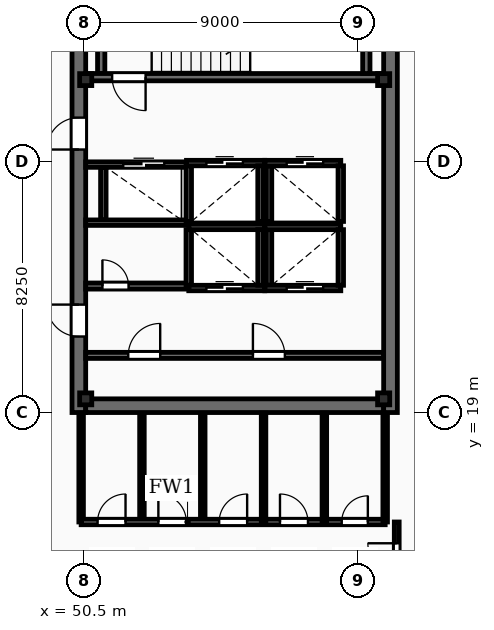
"""IFC4 building model, lengths in metres.
Left out: names, types, materials, properties, quantities, classifications, styles, units other than length and angle.
Written with IfcOpenShell. Run it as: python <this file> out.ifc"""

import sys

from ifc_helpers import new_model, si_unit, direction, frame, frame_2d, origin, origin_2d, place, context, subcontext, project, spatial, rectangle, i_section, extrude, element, fill, save


model = new_model("IFC4")
c1 = context("Model", 3, precision=1e-05, world=origin(), true_north=direction((0.0, 1.0)))
c2 = subcontext(c1, "Body", "Model", "MODEL_VIEW")
j1 = project(units=[si_unit("LENGTHUNIT", "METRE"), si_unit("PLANEANGLEUNIT", "RADIAN")], contexts=[c1])
p1 = place(None, origin())
s1 = spatial("IfcSite", under=j1, at=p1, CompositionType="ELEMENT")
p2 = place(p1, origin())
s2 = spatial("IfcBuilding", under=s1, at=p2, CompositionType="ELEMENT")
p3 = place(p2, frame((0.0, 0.0, 232.2)))
s3 = spatial("IfcBuildingStorey", under=s2, at=p3, CompositionType="ELEMENT", Elevation=232.2)
p4 = place(p3, frame((50.325, 19.0, -0.27), z_axis=(0.0, 0.0, 1.0), x_axis=(0.0, 1.0, 0.0)))
e1 = element("IfcWall", 1, at=p4, inside=s3, PredefinedType="SHEAR", context=c2, shape_type="SweptSolid", body=[
    extrude(rectangle(XDim=20.8, YDim=0.45, at=frame_2d((10.4, 0.0))), origin(), (0.0, 0.0, 1.0), 3.75),
])
p5 = place(p4, frame((2.5, 0.0, 0.27)))
e2 = element("IfcOpeningElement", 2, at=p5, cuts=e1, PredefinedType="OPENING", context=c2, shape_type="SweptSolid", body=[
    extrude(rectangle(XDim=1.05, YDim=2.15, at=frame_2d((0.525, 1.075))), frame((0.0, 0.235, 0.0), z_axis=(0.0, -1.0, 0.0), x_axis=(1.0, 0.0, 0.0)), (0.0, 0.0, 1.0), 0.47),
])
p6 = place(p4, frame((8.65, 0.0, 0.27)))
e3 = element("IfcOpeningElement", 3, at=p6, cuts=e1, PredefinedType="OPENING", context=c2, shape_type="SweptSolid", body=[
    extrude(rectangle(XDim=1.05, YDim=2.15, at=frame_2d((0.525, 1.075))), frame((0.0, 0.235, 0.0), z_axis=(0.0, -1.0, 0.0), x_axis=(1.0, 0.0, 0.0)), (0.0, 0.0, 1.0), 0.47),
])
p7 = place(p4, frame((14.62, 0.0, 0.27)))
e4 = element("IfcOpeningElement", 4, at=p7, cuts=e1, PredefinedType="OPENING", context=c2, shape_type="SweptSolid", body=[
    extrude(rectangle(XDim=1.1, YDim=2.15, at=frame_2d((0.55, 1.075))), frame((0.0, 0.235, 0.0), z_axis=(0.0, -1.0, 0.0), x_axis=(1.0, 0.0, 0.0)), (0.0, 0.0, 1.0), 0.47),
])
p8 = place(p3, frame((60.575, 19.0, -0.27), z_axis=(0.0, 0.0, 1.0), x_axis=(0.0, 1.0, 0.0)))
e5 = element("IfcWall", 5, at=p8, inside=s3, PredefinedType="SHEAR", context=c2, shape_type="SweptSolid", body=[
    extrude(rectangle(XDim=20.8, YDim=0.45, at=frame_2d((10.4, 0.0))), origin(), (0.0, 0.0, 1.0), 3.75),
])
p9 = place(p3, frame((50.55, 19.225, -0.27), z_axis=(0.0, 0.0, 1.0), x_axis=(1.0, 0.0, 0.0)))
e6 = element("IfcWall", 6, at=p9, inside=s3, PredefinedType="SHEAR", context=c2, shape_type="SweptSolid", body=[
    extrude(rectangle(XDim=9.8, YDim=0.45, at=frame_2d((4.9, 0.0))), origin(), (0.0, 0.0, 1.0), 3.75),
])
for number, where, z_axis, x_axis in (
    (7, (50.55, 19.45, -0.27), (0.0, 0.0, 1.0), (1.0, 0.0, 0.0)),
    (8, (60.35, 19.45, -0.27), (0.0, 0.0, 1.0), (1.0, 0.0, 0.0)),
    (9, (50.55, 29.95, -0.27), (0.0, 0.0, 1.0), (1.0, 0.0, 0.0)),
    (10, (60.35, 29.95, -0.27), (0.0, 0.0, 1.0), (1.0, 0.0, 0.0)),
):
    element("IfcColumn", number, at=place(p3, frame(where, z_axis=z_axis, x_axis=x_axis)), inside=s3, PredefinedType="COLUMN", context=c2, shape_type="SweptSolid", body=[
        extrude(i_section(OverallWidth=0.399, OverallDepth=0.393, WebThickness=0.023, FlangeThickness=0.037, FilletRadius=0.02, at=origin_2d()), origin(), (0.0, 0.0, 1.0), 3.75),
    ])
p10 = place(p3, frame((60.35, 30.03, 0.0), z_axis=(0.0, 0.0, 1.0), x_axis=(-1.0, 0.0, 0.0)))
e11 = element("IfcWall", 11, at=p10, inside=s3, PredefinedType="SOLIDWALL", context=c2, shape_type="SweptSolid", body=[
    extrude(rectangle(XDim=9.8, YDim=0.24, at=frame_2d((4.9, 0.0))), origin(), (0.0, 0.0, 1.0), 3.48),
])
p11 = place(p10, frame((7.83, 0.0, 0.0)))
e12 = element("IfcOpeningElement", 12, at=p11, cuts=e11, PredefinedType="OPENING", context=c2, shape_type="SweptSolid", body=[
    extrude(rectangle(XDim=1.1, YDim=2.15, at=frame_2d((0.55, 1.075))), frame((0.0, 0.13, 0.0), z_axis=(0.0, -1.0, 0.0), x_axis=(1.0, 0.0, 0.0)), (0.0, 0.0, 1.0), 0.26),
])
for number, where, z_axis, x_axis in (
    (13, (51.06, 30.15, 0.0), (0.0, 0.0, 1.0), (0.0, 1.0, 0.0)),
    (14, (59.78, 30.15, 0.0), (0.0, 0.0, 1.0), (0.0, 1.0, 0.0)),
):
    element("IfcWall", number, at=place(p3, frame(where, z_axis=z_axis, x_axis=x_axis)), inside=s3, PredefinedType="SOLIDWALL", context=c2, shape_type="SweptSolid", body=[
        extrude(rectangle(XDim=3.23, YDim=0.24, at=frame_2d((1.615, 0.0))), origin(), (0.0, 0.0, 1.0), 3.48),
    ])
p12 = place(p3, frame((53.94, 25.105, 0.0), z_axis=(0.0, 0.0, 1.0), x_axis=(1.0, 0.0, 0.0)))
e15 = element("IfcWall", 15, at=p12, inside=s3, PredefinedType="SOLIDWALL", context=c2, shape_type="SweptSolid", body=[
    extrude(rectangle(XDim=2.5, YDim=0.18, at=frame_2d((1.25, 0.0))), origin(), (0.0, 0.0, 1.0), 3.48),
])
p13 = place(p3, frame((53.94, 23.095, 0.0), z_axis=(0.0, 0.0, 1.0), x_axis=(1.0, 0.0, 0.0)))
e16 = element("IfcWall", 16, at=p13, inside=s3, PredefinedType="SOLIDWALL", context=c2, shape_type="SweptSolid", body=[
    extrude(rectangle(XDim=2.5, YDim=0.18, at=frame_2d((1.25, 0.0))), origin(), (0.0, 0.0, 1.0), 3.48),
])
p14 = place(p13, frame((0.58, 0.0, 0.0)))
e17 = element("IfcOpeningElement", 17, at=p14, cuts=e16, PredefinedType="OPENING", context=c2, shape_type="SweptSolid", body=[
    extrude(rectangle(XDim=1.2, YDim=2.2, at=frame_2d((0.6, 1.1))), frame((0.0, 0.1, 0.0), z_axis=(0.0, -1.0, 0.0), x_axis=(1.0, 0.0, 0.0)), (0.0, 0.0, 1.0), 0.2),
])
for number, where, z_axis, x_axis in (
    (18, (53.94, 23.185, 0.0), (0.0, 0.0, 1.0), (0.0, 1.0, 0.0)),
    (19, (56.3, 23.185, 0.0), (0.0, 0.0, 1.0), (0.0, 1.0, 0.0)),
):
    element("IfcWall", number, at=place(p3, frame(where, z_axis=z_axis, x_axis=x_axis)), inside=s3, PredefinedType="SOLIDWALL", context=c2, shape_type="SweptSolid", body=[
        extrude(rectangle(XDim=1.83, YDim=0.18, at=frame_2d((0.915, 0.0))), origin(), (0.0, 0.0, 1.0), 3.48),
    ])
p15 = place(p3, frame((56.44, 25.105, 0.0), z_axis=(0.0, 0.0, 1.0), x_axis=(1.0, 0.0, 0.0)))
e20 = element("IfcWall", 20, at=p15, inside=s3, PredefinedType="SOLIDWALL", context=c2, shape_type="SweptSolid", body=[
    extrude(rectangle(XDim=2.5, YDim=0.18, at=frame_2d((1.25, 0.0))), origin(), (0.0, 0.0, 1.0), 3.48),
])
p16 = place(p3, frame((56.44, 23.095, 0.0), z_axis=(0.0, 0.0, 1.0), x_axis=(1.0, 0.0, 0.0)))
e21 = element("IfcWall", 21, at=p16, inside=s3, PredefinedType="SOLIDWALL", context=c2, shape_type="SweptSolid", body=[
    extrude(rectangle(XDim=2.5, YDim=0.18, at=frame_2d((1.25, 0.0))), origin(), (0.0, 0.0, 1.0), 3.48),
])
p17 = place(p16, frame((0.72, 0.0, 0.0)))
e22 = element("IfcOpeningElement", 22, at=p17, cuts=e21, PredefinedType="OPENING", context=c2, shape_type="SweptSolid", body=[
    extrude(rectangle(XDim=1.2, YDim=2.2, at=frame_2d((0.6, 1.1))), frame((0.0, 0.1, 0.0), z_axis=(0.0, -1.0, 0.0), x_axis=(1.0, 0.0, 0.0)), (0.0, 0.0, 1.0), 0.2),
])
for number, where, z_axis, x_axis in (
    (23, (56.58, 23.185, 0.0), (0.0, 0.0, 1.0), (0.0, 1.0, 0.0)),
    (24, (58.94, 23.185, 0.0), (0.0, 0.0, 1.0), (0.0, 1.0, 0.0)),
):
    element("IfcWall", number, at=place(p3, frame(where, z_axis=z_axis, x_axis=x_axis)), inside=s3, PredefinedType="SOLIDWALL", context=c2, shape_type="SweptSolid", body=[
        extrude(rectangle(XDim=1.83, YDim=0.18, at=frame_2d((0.915, 0.0))), origin(), (0.0, 0.0, 1.0), 3.48),
    ])
p18 = place(p3, frame((53.865, 27.205, 0.0), z_axis=(0.0, 0.0, 1.0), x_axis=(1.0, 0.0, 0.0)))
e25 = element("IfcWall", 25, at=p18, inside=s3, PredefinedType="SOLIDWALL", context=c2, shape_type="SweptSolid", body=[
    extrude(rectangle(XDim=2.575, YDim=0.18, at=frame_2d((1.288, 0.0))), origin(), (0.0, 0.0, 1.0), 3.48),
])
p19 = place(p18, frame((0.655, 0.0, 0.0)))
e26 = element("IfcOpeningElement", 26, at=p19, cuts=e25, PredefinedType="OPENING", context=c2, shape_type="SweptSolid", body=[
    extrude(rectangle(XDim=1.2, YDim=2.2, at=frame_2d((0.6, 1.1))), frame((0.0, 0.1, 0.0), z_axis=(0.0, -1.0, 0.0), x_axis=(1.0, 0.0, 0.0)), (0.0, 0.0, 1.0), 0.2),
])
for number, where, z_axis, x_axis in (
    (27, (53.94, 25.285, 0.0), (0.0, 0.0, 1.0), (0.0, 1.0, 0.0)),
    (28, (56.3, 25.285, 0.0), (0.0, 0.0, 1.0), (0.0, 1.0, 0.0)),
):
    element("IfcWall", number, at=place(p3, frame(where, z_axis=z_axis, x_axis=x_axis)), inside=s3, PredefinedType="SOLIDWALL", context=c2, shape_type="SweptSolid", body=[
        extrude(rectangle(XDim=1.83, YDim=0.18, at=frame_2d((0.915, 0.0))), origin(), (0.0, 0.0, 1.0), 3.48),
    ])
p20 = place(p3, frame((56.44, 27.205, 0.0), z_axis=(0.0, 0.0, 1.0), x_axis=(1.0, 0.0, 0.0)))
e29 = element("IfcWall", 29, at=p20, inside=s3, PredefinedType="SOLIDWALL", context=c2, shape_type="SweptSolid", body=[
    extrude(rectangle(XDim=2.5, YDim=0.18, at=frame_2d((1.25, 0.0))), origin(), (0.0, 0.0, 1.0), 3.48),
])
p21 = place(p20, frame((0.72, 0.0, 0.0)))
e30 = element("IfcOpeningElement", 30, at=p21, cuts=e29, PredefinedType="OPENING", context=c2, shape_type="SweptSolid", body=[
    extrude(rectangle(XDim=1.2, YDim=2.2, at=frame_2d((0.6, 1.1))), frame((0.0, 0.1, 0.0), z_axis=(0.0, -1.0, 0.0), x_axis=(1.0, 0.0, 0.0)), (0.0, 0.0, 1.0), 0.2),
])
for number, where, z_axis, x_axis in (
    (31, (56.58, 25.285, 0.0), (0.0, 0.0, 1.0), (0.0, 1.0, 0.0)),
    (32, (58.94, 25.285, 0.0), (0.0, 0.0, 1.0), (0.0, 1.0, 0.0)),
):
    element("IfcWall", number, at=place(p3, frame(where, z_axis=z_axis, x_axis=x_axis)), inside=s3, PredefinedType="SOLIDWALL", context=c2, shape_type="SweptSolid", body=[
        extrude(rectangle(XDim=1.83, YDim=0.18, at=frame_2d((0.915, 0.0))), origin(), (0.0, 0.0, 1.0), 3.48),
    ])
p22 = place(p3, frame((50.55, 27.155, 0.0), z_axis=(0.0, 0.0, 1.0), x_axis=(1.0, 0.0, 0.0)))
e33 = element("IfcWall", 33, at=p22, inside=s3, PredefinedType="SOLIDWALL", context=c2, shape_type="SweptSolid", body=[
    extrude(rectangle(XDim=3.315, YDim=0.18, at=frame_2d((1.657, 0.0))), origin(), (0.0, 0.0, 1.0), 3.48),
])
p23 = place(p22, frame((1.235, 0.0, 0.0)))
e34 = element("IfcOpeningElement", 34, at=p23, cuts=e33, PredefinedType="OPENING", context=c2, shape_type="SweptSolid", body=[
    extrude(rectangle(XDim=1.35, YDim=2.3, at=frame_2d((0.675, 1.15))), frame((0.0, 0.1, 0.0), z_axis=(0.0, -1.0, 0.0), x_axis=(1.0, 0.0, 0.0)), (0.0, 0.0, 1.0), 0.2),
])
p24 = place(p3, frame((50.55, 25.245, 0.0), z_axis=(0.0, 0.0, 1.0), x_axis=(1.0, 0.0, 0.0)))
e35 = element("IfcWall", 35, at=p24, inside=s3, PredefinedType="SOLIDWALL", context=c2, shape_type="SweptSolid", body=[
    extrude(rectangle(XDim=3.315, YDim=0.18, at=frame_2d((1.657, 0.0))), origin(), (0.0, 0.0, 1.0), 3.48),
])
p25 = place(p3, frame((51.13, 25.335, 0.0), z_axis=(0.0, 0.0, 1.0), x_axis=(0.0, 1.0, 0.0)))
e36 = element("IfcWall", 36, at=p25, inside=s3, PredefinedType="SOLIDWALL", context=c2, shape_type="SweptSolid", body=[
    extrude(rectangle(XDim=1.73, YDim=0.18, at=frame_2d((0.865, 0.0))), origin(), (0.0, 0.0, 1.0), 3.48),
])
p26 = place(p3, frame((50.55, 20.88, 0.0), z_axis=(0.0, 0.0, 1.0), x_axis=(1.0, 0.0, 0.0)))
e37 = element("IfcWall", 37, at=p26, inside=s3, PredefinedType="SOLIDWALL", context=c2, shape_type="SweptSolid", body=[
    extrude(rectangle(XDim=9.8, YDim=0.2, at=frame_2d((4.9, 0.0))), origin(), (0.0, 0.0, 1.0), 2.54),
])
p27 = place(p26, frame((1.4, 0.0, 0.0)))
e38 = element("IfcOpeningElement", 38, at=p27, cuts=e37, PredefinedType="OPENING", context=c2, shape_type="SweptSolid", body=[
    extrude(rectangle(XDim=1.05, YDim=2.15, at=frame_2d((0.525, 1.075))), frame((0.0, 0.11, 0.0), z_axis=(0.0, -1.0, 0.0), x_axis=(1.0, 0.0, 0.0)), (0.0, 0.0, 1.0), 0.22),
])
p28 = place(p26, frame((5.5, 0.0, 0.0)))
e39 = element("IfcOpeningElement", 39, at=p28, cuts=e37, PredefinedType="OPENING", context=c2, shape_type="SweptSolid", body=[
    extrude(rectangle(XDim=1.05, YDim=2.15, at=frame_2d((0.525, 1.075))), frame((0.0, 0.11, 0.0), z_axis=(0.0, -1.0, 0.0), x_axis=(1.0, 0.0, 0.0)), (0.0, 0.0, 1.0), 0.22),
])
p29 = place(p3, frame((50.55, 23.16, 0.0), z_axis=(0.0, 0.0, 1.0), x_axis=(1.0, 0.0, 0.0)))
e40 = element("IfcWall", 40, at=p29, inside=s3, PredefinedType="SOLIDWALL", context=c2, shape_type="SweptSolid", body=[
    extrude(rectangle(XDim=3.33, YDim=0.2, at=frame_2d((1.665, 0.0))), origin(), (0.0, 0.0, 1.0), 2.54),
])
p30 = place(p29, frame((0.55, 0.0, 0.0)))
e41 = element("IfcOpeningElement", 41, at=p30, cuts=e40, PredefinedType="OPENING", context=c2, shape_type="SweptSolid", body=[
    extrude(rectangle(XDim=0.86, YDim=2.05, at=frame_2d((0.43, 1.025))), frame((0.0, 0.11, 0.0), z_axis=(0.0, -1.0, 0.0), x_axis=(1.0, 0.0, 0.0)), (0.0, 0.0, 1.0), 0.22),
])
for number, where, z_axis, x_axis in (
    (42, (52.4, 15.4, 0.0), (0.0, 0.0, 1.0), (0.0, 1.0, 0.0)),
    (43, (54.4, 15.4, 0.0), (0.0, 0.0, 1.0), (0.0, 1.0, 0.0)),
    (44, (56.4, 15.4, 0.0), (0.0, 0.0, 1.0), (0.0, 1.0, 0.0)),
    (45, (58.4, 15.4, 0.0), (0.0, 0.0, 1.0), (0.0, 1.0, 0.0)),
):
    element("IfcWall", number, at=place(p3, frame(where, z_axis=z_axis, x_axis=x_axis)), inside=s3, PredefinedType="PARTITIONING", context=c2, shape_type="SweptSolid", body=[
        extrude(rectangle(XDim=3.58, YDim=0.15, at=frame_2d((1.79, 0.0))), origin(), (0.0, 0.0, 1.0), 2.54),
    ])
p31 = place(p3, frame((50.4, 15.4, 0.0), z_axis=(0.0, 0.0, 1.0), x_axis=(1.0, 0.0, 0.0)))
e46 = element("IfcWall", 46, at=p31, inside=s3, PredefinedType="SOLIDWALL", context=c2, shape_type="SweptSolid", body=[
    extrude(rectangle(XDim=10.0, YDim=0.18, at=frame_2d((5.0, 0.0))), origin(), (0.0, 0.0, 1.0), 2.54),
])
p32 = place(p31, frame((0.54, 0.0, 0.0)))
e47 = element("IfcOpeningElement", 47, at=p32, cuts=e46, PredefinedType="OPENING", context=c2, shape_type="SweptSolid", body=[
    extrude(rectangle(XDim=0.92, YDim=2.1, at=frame_2d((0.46, 1.05))), frame((0.0, 0.1, 0.0), z_axis=(0.0, -1.0, 0.0), x_axis=(1.0, 0.0, 0.0)), (0.0, 0.0, 1.0), 0.2),
])
p33 = place(p31, frame((2.54, 0.0, 0.0)))
e48 = element("IfcOpeningElement", 48, at=p33, cuts=e46, PredefinedType="OPENING", context=c2, shape_type="SweptSolid", body=[
    extrude(rectangle(XDim=0.92, YDim=2.1, at=frame_2d((0.46, 1.05))), frame((0.0, 0.1, 0.0), z_axis=(0.0, -1.0, 0.0), x_axis=(1.0, 0.0, 0.0)), (0.0, 0.0, 1.0), 0.2),
])
p34 = place(p31, frame((4.54, 0.0, 0.0)))
e49 = element("IfcOpeningElement", 49, at=p34, cuts=e46, PredefinedType="OPENING", context=c2, shape_type="SweptSolid", body=[
    extrude(rectangle(XDim=0.92, YDim=2.1, at=frame_2d((0.46, 1.05))), frame((0.0, 0.1, 0.0), z_axis=(0.0, -1.0, 0.0), x_axis=(1.0, 0.0, 0.0)), (0.0, 0.0, 1.0), 0.2),
])
p35 = place(p31, frame((6.54, 0.0, 0.0)))
e50 = element("IfcOpeningElement", 50, at=p35, cuts=e46, PredefinedType="OPENING", context=c2, shape_type="SweptSolid", body=[
    extrude(rectangle(XDim=0.92, YDim=2.1, at=frame_2d((0.46, 1.05))), frame((0.0, 0.1, 0.0), z_axis=(0.0, -1.0, 0.0), x_axis=(1.0, 0.0, 0.0)), (0.0, 0.0, 1.0), 0.2),
])
p36 = place(p31, frame((8.57, 0.0, 0.0)))
e51 = element("IfcOpeningElement", 51, at=p36, cuts=e46, PredefinedType="OPENING", context=c2, shape_type="SweptSolid", body=[
    extrude(rectangle(XDim=0.86, YDim=2.05, at=frame_2d((0.43, 1.025))), frame((0.0, 0.1, 0.0), z_axis=(0.0, -1.0, 0.0), x_axis=(1.0, 0.0, 0.0)), (0.0, 0.0, 1.0), 0.2),
])
for number, where, z_axis, x_axis in (
    (52, (50.4, 15.4, 0.0), (0.0, 0.0, 1.0), (0.0, 1.0, 0.0)),
    (53, (60.4, 15.4, 0.0), (0.0, 0.0, 1.0), (0.0, 1.0, 0.0)),
):
    element("IfcWall", number, at=place(p3, frame(where, z_axis=z_axis, x_axis=x_axis)), inside=s3, PredefinedType="PARTITIONING", context=c2, shape_type="SweptSolid", body=[
        extrude(rectangle(XDim=3.58, YDim=0.15, at=frame_2d((1.79, 0.0))), origin(), (0.0, 0.0, 1.0), 2.54),
    ])
p37 = place(p3, frame((60.78, 13.1, 0.0), z_axis=(0.0, 0.0, 1.0), x_axis=(0.0, 1.0, 0.0)))
e54 = element("IfcWall", 54, at=p37, inside=s3, PredefinedType="PARTITIONING", context=c2, shape_type="SweptSolid", body=[
    extrude(rectangle(XDim=2.3, YDim=0.16, at=frame_2d((1.15, 0.0))), origin(), (0.0, 0.0, 1.0), 2.54),
])
p38 = place(p37, frame((0.65, 0.0, 0.0)))
e55 = element("IfcOpeningElement", 55, at=p38, cuts=e54, PredefinedType="OPENING", context=c2, shape_type="SweptSolid", body=[
    extrude(rectangle(XDim=0.95, YDim=2.15, at=frame_2d((0.475, 1.075))), frame((0.0, 0.09, 0.0), z_axis=(0.0, -1.0, 0.0), x_axis=(1.0, 0.0, 0.0)), (0.0, 0.0, 1.0), 0.18),
])
p39 = place(p5, origin())
e56 = element("IfcDoor", 56, at=p39, inside=s3, OperationType="SINGLE_SWING_RIGHT", PredefinedType="DOOR", context=c2, shape_type="SweptSolid", body=[
    extrude(rectangle(XDim=1.05, YDim=2.15, at=frame_2d((0.525, 1.075))), frame((0.0, 0.025, 0.0), z_axis=(0.0, -1.0, 0.0), x_axis=(1.0, 0.0, 0.0)), (0.0, 0.0, 1.0), 0.05),
])
fill(e2, e56)
p40 = place(p6, origin())
e57 = element("IfcDoor", 57, at=p40, inside=s3, OperationType="SINGLE_SWING_LEFT", PredefinedType="DOOR", context=c2, shape_type="SweptSolid", body=[
    extrude(rectangle(XDim=1.05, YDim=2.15, at=frame_2d((0.525, 1.075))), frame((0.0, 0.025, 0.0), z_axis=(0.0, -1.0, 0.0), x_axis=(1.0, 0.0, 0.0)), (0.0, 0.0, 1.0), 0.05),
])
fill(e3, e57)
p41 = place(p11, origin())
e58 = element("IfcDoor", 58, at=p41, inside=s3, OperationType="SINGLE_SWING_LEFT", PredefinedType="DOOR", context=c2, shape_type="SweptSolid", body=[
    extrude(rectangle(XDim=1.1, YDim=2.15, at=frame_2d((0.55, 1.075))), frame((0.0, 0.025, 0.0), z_axis=(0.0, -1.0, 0.0), x_axis=(1.0, 0.0, 0.0)), (0.0, 0.0, 1.0), 0.05),
])
fill(e12, e58)
p42 = place(p14, origin())
e59 = element("IfcDoor", 59, at=p42, inside=s3, OperationType="DOUBLE_DOOR_SLIDING", PredefinedType="DOOR", context=c2, shape_type="SweptSolid", body=[
    extrude(rectangle(XDim=1.2, YDim=2.2, at=frame_2d((0.6, 1.1))), frame((0.0, 0.025, 0.0), z_axis=(0.0, -1.0, 0.0), x_axis=(1.0, 0.0, 0.0)), (0.0, 0.0, 1.0), 0.05),
])
fill(e17, e59)
p43 = place(p17, origin())
e60 = element("IfcDoor", 60, at=p43, inside=s3, OperationType="DOUBLE_DOOR_SLIDING", PredefinedType="DOOR", context=c2, shape_type="SweptSolid", body=[
    extrude(rectangle(XDim=1.2, YDim=2.2, at=frame_2d((0.6, 1.1))), frame((0.0, 0.025, 0.0), z_axis=(0.0, -1.0, 0.0), x_axis=(1.0, 0.0, 0.0)), (0.0, 0.0, 1.0), 0.05),
])
fill(e22, e60)
p44 = place(p19, origin())
e61 = element("IfcDoor", 61, at=p44, inside=s3, OperationType="DOUBLE_DOOR_SLIDING", PredefinedType="DOOR", context=c2, shape_type="SweptSolid", body=[
    extrude(rectangle(XDim=1.2, YDim=2.2, at=frame_2d((0.6, 1.1))), frame((0.0, 0.025, 0.0), z_axis=(0.0, -1.0, 0.0), x_axis=(1.0, 0.0, 0.0)), (0.0, 0.0, 1.0), 0.05),
])
fill(e26, e61)
p45 = place(p21, origin())
e62 = element("IfcDoor", 62, at=p45, inside=s3, OperationType="DOUBLE_DOOR_SLIDING", PredefinedType="DOOR", context=c2, shape_type="SweptSolid", body=[
    extrude(rectangle(XDim=1.2, YDim=2.2, at=frame_2d((0.6, 1.1))), frame((0.0, 0.025, 0.0), z_axis=(0.0, -1.0, 0.0), x_axis=(1.0, 0.0, 0.0)), (0.0, 0.0, 1.0), 0.05),
])
fill(e30, e62)
p46 = place(p23, origin())
e63 = element("IfcDoor", 63, at=p46, inside=s3, OperationType="DOUBLE_DOOR_SLIDING", PredefinedType="DOOR", context=c2, shape_type="SweptSolid", body=[
    extrude(rectangle(XDim=1.35, YDim=2.3, at=frame_2d((0.675, 1.15))), frame((0.0, 0.025, 0.0), z_axis=(0.0, -1.0, 0.0), x_axis=(1.0, 0.0, 0.0)), (0.0, 0.0, 1.0), 0.05),
])
fill(e34, e63)
p47 = place(p27, origin())
e64 = element("IfcDoor", 64, at=p47, inside=s3, OperationType="SINGLE_SWING_RIGHT", PredefinedType="DOOR", context=c2, shape_type="SweptSolid", body=[
    extrude(rectangle(XDim=1.05, YDim=2.15, at=frame_2d((0.525, 1.075))), frame((0.0, 0.025, 0.0), z_axis=(0.0, -1.0, 0.0), x_axis=(1.0, 0.0, 0.0)), (0.0, 0.0, 1.0), 0.05),
])
fill(e38, e64)
p48 = place(p28, origin())
e65 = element("IfcDoor", 65, at=p48, inside=s3, OperationType="SINGLE_SWING_LEFT", PredefinedType="DOOR", context=c2, shape_type="SweptSolid", body=[
    extrude(rectangle(XDim=1.05, YDim=2.15, at=frame_2d((0.525, 1.075))), frame((0.0, 0.025, 0.0), z_axis=(0.0, -1.0, 0.0), x_axis=(1.0, 0.0, 0.0)), (0.0, 0.0, 1.0), 0.05),
])
fill(e39, e65)
p49 = place(p30, origin())
e66 = element("IfcDoor", 66, at=p49, inside=s3, OperationType="SINGLE_SWING_LEFT", PredefinedType="DOOR", context=c2, shape_type="SweptSolid", body=[
    extrude(rectangle(XDim=0.86, YDim=2.05, at=frame_2d((0.43, 1.025))), frame((0.0, 0.025, 0.0), z_axis=(0.0, -1.0, 0.0), x_axis=(1.0, 0.0, 0.0)), (0.0, 0.0, 1.0), 0.05),
])
fill(e41, e66)
p50 = place(p32, origin())
e67 = element("IfcDoor", 67, at=p50, inside=s3, OperationType="SINGLE_SWING_RIGHT", PredefinedType="DOOR", context=c2, shape_type="SweptSolid", body=[
    extrude(rectangle(XDim=0.92, YDim=2.1, at=frame_2d((0.46, 1.05))), frame((0.0, 0.025, 0.0), z_axis=(0.0, -1.0, 0.0), x_axis=(1.0, 0.0, 0.0)), (0.0, 0.0, 1.0), 0.05),
])
fill(e47, e67)
p51 = place(p33, origin())
e68 = element("IfcDoor", 68, at=p51, inside=s3, OperationType="SINGLE_SWING_LEFT", PredefinedType="DOOR", context=c2, shape_type="SweptSolid", body=[
    extrude(rectangle(XDim=0.92, YDim=2.1, at=frame_2d((0.46, 1.05))), frame((0.0, 0.025, 0.0), z_axis=(0.0, -1.0, 0.0), x_axis=(1.0, 0.0, 0.0)), (0.0, 0.0, 1.0), 0.05),
])
fill(e48, e68)
p52 = place(p34, origin())
e69 = element("IfcDoor", 69, at=p52, inside=s3, OperationType="SINGLE_SWING_RIGHT", PredefinedType="DOOR", context=c2, shape_type="SweptSolid", body=[
    extrude(rectangle(XDim=0.92, YDim=2.1, at=frame_2d((0.46, 1.05))), frame((0.0, 0.025, 0.0), z_axis=(0.0, -1.0, 0.0), x_axis=(1.0, 0.0, 0.0)), (0.0, 0.0, 1.0), 0.05),
])
fill(e49, e69)
p53 = place(p35, origin())
e70 = element("IfcDoor", 70, at=p53, inside=s3, OperationType="SINGLE_SWING_LEFT", PredefinedType="DOOR", context=c2, shape_type="SweptSolid", body=[
    extrude(rectangle(XDim=0.92, YDim=2.1, at=frame_2d((0.46, 1.05))), frame((0.0, 0.025, 0.0), z_axis=(0.0, -1.0, 0.0), x_axis=(1.0, 0.0, 0.0)), (0.0, 0.0, 1.0), 0.05),
])
fill(e50, e70)
p54 = place(p36, origin())
e71 = element("IfcDoor", 71, at=p54, inside=s3, OperationType="SINGLE_SWING_RIGHT", PredefinedType="DOOR", context=c2, shape_type="SweptSolid", body=[
    extrude(rectangle(XDim=0.86, YDim=2.05, at=frame_2d((0.43, 1.025))), frame((0.0, 0.025, 0.0), z_axis=(0.0, -1.0, 0.0), x_axis=(1.0, 0.0, 0.0)), (0.0, 0.0, 1.0), 0.05),
])
fill(e51, e71)
p55 = place(p38, origin())
e72 = element("IfcDoor", 72, at=p55, inside=s3, OperationType="SINGLE_SWING_RIGHT", PredefinedType="DOOR", context=c2, shape_type="SweptSolid", body=[
    extrude(rectangle(XDim=0.95, YDim=2.15, at=frame_2d((0.475, 1.075))), frame((0.0, 0.025, 0.0), z_axis=(0.0, -1.0, 0.0), x_axis=(1.0, 0.0, 0.0)), (0.0, 0.0, 1.0), 0.05),
])
fill(e55, e72)
save(model, sys.argv[1])
